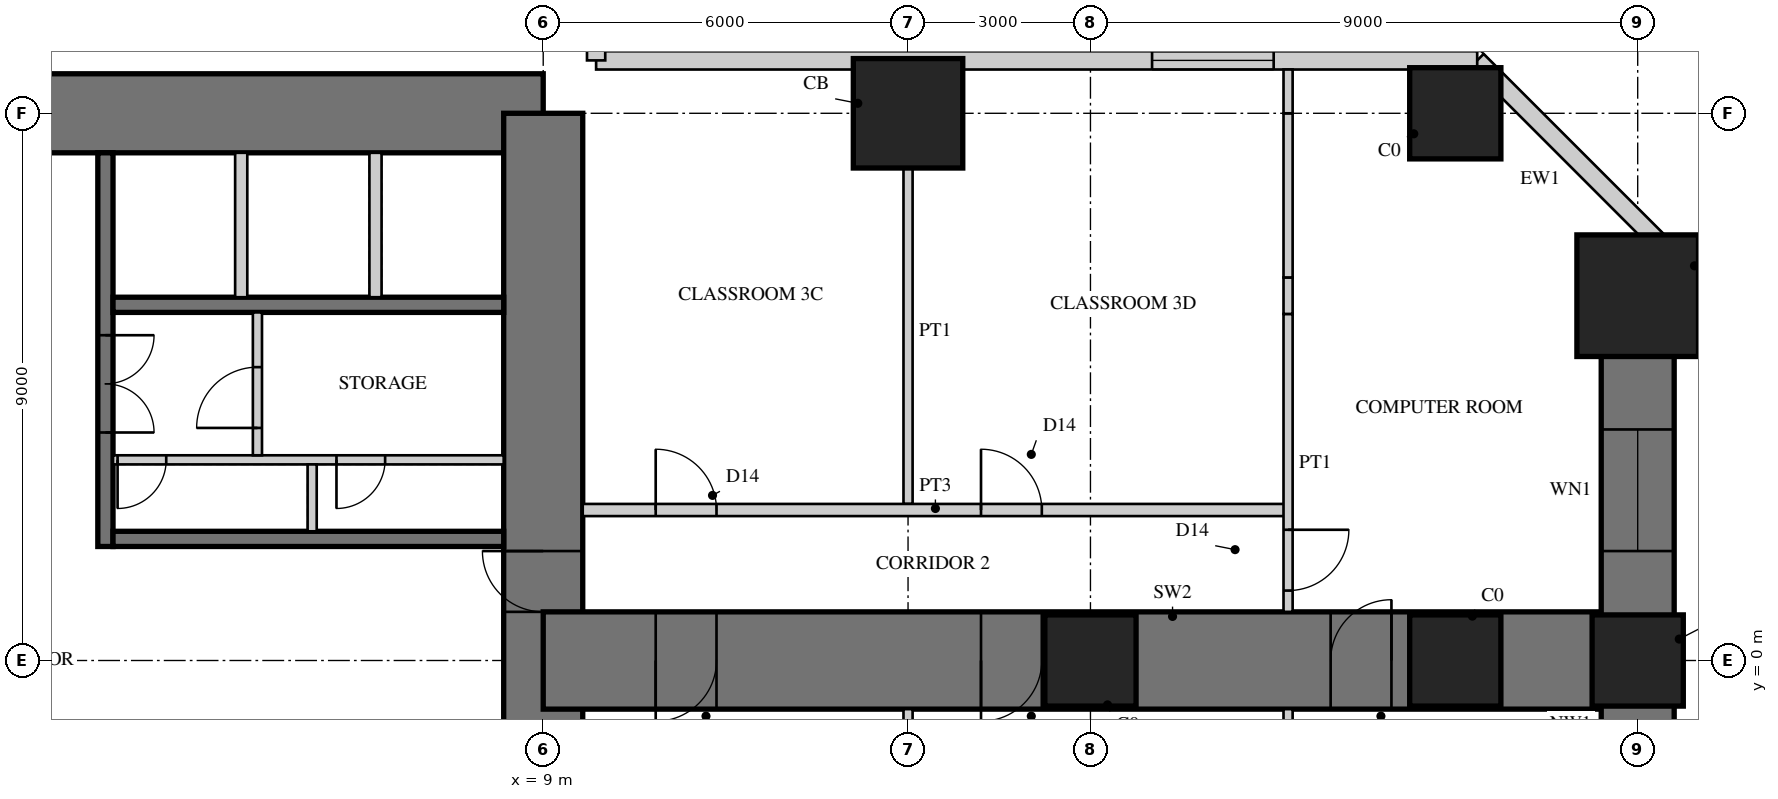
"""IFC4 building model, lengths in metres.
Left out: names, types, materials, properties, quantities, classifications, styles, units other than length and angle.
Written with IfcOpenShell. Run it as: python <this file> out.ifc"""

import sys

from ifc_helpers import new_model, si_unit, direction, frame, frame_2d, origin, origin_2d, place, context, subcontext, project, spatial, rectangle, hollow_rectangle, extrude, element, fill, save


model = new_model("IFC4")
c1 = context("Model", 3, precision=1e-05, world=origin(), true_north=direction((0.0, 1.0)))
c2 = subcontext(c1, "Body", "Model", "MODEL_VIEW")
j1 = project(units=[si_unit("LENGTHUNIT", "METRE"), si_unit("PLANEANGLEUNIT", "RADIAN")], contexts=[c1])
p1 = place(None, origin())
s1 = spatial("IfcSite", under=j1, at=p1, CompositionType="ELEMENT")
p2 = place(p1, origin())
s2 = spatial("IfcBuilding", under=s1, at=p2, CompositionType="ELEMENT")
p3 = place(p2, frame((0.0, 0.0, 14.0)))
s3 = spatial("IfcBuildingStorey", under=s2, at=p3, CompositionType="ELEMENT", Elevation=14.0)
p4 = place(p3, frame((9.0, 9.0, 0.0), z_axis=(0.0, 0.0, 1.0), x_axis=(-1.0, 0.0, 0.0)))
e1 = element("IfcWall", 1, at=p4, inside=s3, PredefinedType="SHEAR", context=c2, shape_type="SweptSolid", body=[
    extrude(rectangle(XDim=18.0, YDim=1.3, at=frame_2d((9.0, 0.0))), origin(), (0.0, 0.0, 1.0), 4.5),
])
p5 = place(p4, frame((9.8, 0.0, 0.0)))
e2 = element("IfcOpeningElement", 2, at=p5, cuts=e1, PredefinedType="OPENING", context=c2, shape_type="SweptSolid", body=[
    extrude(rectangle(XDim=1.0, YDim=2.4, at=frame_2d((0.5, 1.2))), frame((0.0, 0.66, 0.0), z_axis=(0.0, -1.0, 0.0), x_axis=(1.0, 0.0, 0.0)), (0.0, 0.0, 1.0), 1.32),
])
p6 = place(p3, frame((9.0, -9.0, 0.0), z_axis=(0.0, 0.0, 1.0), x_axis=(0.0, 1.0, 0.0)))
e3 = element("IfcWall", 3, at=p6, inside=s3, PredefinedType="SHEAR", context=c2, shape_type="SweptSolid", body=[
    extrude(rectangle(XDim=18.0, YDim=1.3, at=frame_2d((9.0, 0.0))), origin(), (0.0, 0.0, 1.0), 4.5),
])
p7 = place(p6, frame((9.8, 0.0, 0.0)))
e4 = element("IfcOpeningElement", 4, at=p7, cuts=e3, PredefinedType="OPENING", context=c2, shape_type="SweptSolid", body=[
    extrude(rectangle(XDim=1.0, YDim=2.4, at=frame_2d((0.5, 1.2))), frame((0.0, 0.66, 0.0), z_axis=(0.0, -1.0, 0.0), x_axis=(1.0, 0.0, 0.0)), (0.0, 0.0, 1.0), 1.32),
])
p8 = place(p3, frame((1.8, 1.875, 0.0), z_axis=(0.0, 0.0, 1.0), x_axis=(0.0, 1.0, 0.0)))
e5 = element("IfcWall", 5, at=p8, inside=s3, PredefinedType="SHEAR", context=c2, shape_type="SweptSolid", body=[
    extrude(rectangle(XDim=6.475, YDim=0.25, at=frame_2d((3.238, 0.0))), origin(), (0.0, 0.0, 1.0), 4.5),
])
p9 = place(p8, frame((1.875, 0.0, 0.0)))
e6 = element("IfcOpeningElement", 6, at=p9, cuts=e5, PredefinedType="OPENING", context=c2, shape_type="SweptSolid", body=[
    extrude(rectangle(XDim=1.6, YDim=2.4, at=frame_2d((0.8, 1.2))), frame((0.0, 0.135, 0.0), z_axis=(0.0, -1.0, 0.0), x_axis=(1.0, 0.0, 0.0)), (0.0, 0.0, 1.0), 0.27),
])
for number, where, z_axis, x_axis in (
    (7, (1.925, 2.0, 0.0), (0.0, 0.0, 1.0), (1.0, 0.0, 0.0)),
    (8, (1.925, 5.85, 0.0), (0.0, 0.0, 1.0), (1.0, 0.0, 0.0)),
):
    element("IfcWall", number, at=place(p3, frame(where, z_axis=z_axis, x_axis=x_axis)), inside=s3, PredefinedType="SHEAR", context=c2, shape_type="SweptSolid", body=[
        extrude(rectangle(XDim=6.425, YDim=0.25, at=frame_2d((3.212, 0.0))), origin(), (0.0, 0.0, 1.0), 4.5),
    ])
p10 = place(p3, frame((1.925, 3.3, 0.0), z_axis=(0.0, 0.0, 1.0), x_axis=(1.0, 0.0, 0.0)))
e9 = element("IfcWall", 9, at=p10, inside=s3, PredefinedType="PARTITIONING", context=c2, shape_type="SweptSolid", body=[
    extrude(rectangle(XDim=6.425, YDim=0.15, at=frame_2d((3.212, 0.0))), origin(), (0.0, 0.0, 1.0), 4.5),
])
p11 = place(p10, frame((0.075, 0.0, 0.0)))
e10 = element("IfcOpeningElement", 10, at=p11, cuts=e9, PredefinedType="OPENING", context=c2, shape_type="SweptSolid", body=[
    extrude(rectangle(XDim=0.8, YDim=2.1, at=frame_2d((0.4, 1.05))), frame((0.0, 0.085, 0.0), z_axis=(0.0, -1.0, 0.0), x_axis=(1.0, 0.0, 0.0)), (0.0, 0.0, 1.0), 0.17),
])
p12 = place(p10, frame((3.675, 0.0, 0.0)))
e11 = element("IfcOpeningElement", 11, at=p12, cuts=e9, PredefinedType="OPENING", context=c2, shape_type="SweptSolid", body=[
    extrude(rectangle(XDim=0.8, YDim=2.1, at=frame_2d((0.4, 1.05))), frame((0.0, 0.085, 0.0), z_axis=(0.0, -1.0, 0.0), x_axis=(1.0, 0.0, 0.0)), (0.0, 0.0, 1.0), 0.17),
])
p13 = place(p3, frame((5.2, 2.125, 0.0), z_axis=(0.0, 0.0, 1.0), x_axis=(0.0, 1.0, 0.0)))
e12 = element("IfcWall", 12, at=p13, inside=s3, PredefinedType="PARTITIONING", context=c2, shape_type="SweptSolid", body=[
    extrude(rectangle(XDim=1.1, YDim=0.15, at=frame_2d((0.55, 0.0))), origin(), (0.0, 0.0, 1.0), 4.5),
])
for number, where, z_axis, x_axis in (
    (13, (4.033, 5.975, 0.0), (0.0, 0.0, 1.0), (0.0, 1.0, 0.0)),
    (14, (6.242, 5.975, 0.0), (0.0, 0.0, 1.0), (0.0, 1.0, 0.0)),
):
    element("IfcWall", number, at=place(p3, frame(where, z_axis=z_axis, x_axis=x_axis)), inside=s3, PredefinedType="PARTITIONING", context=c2, shape_type="SweptSolid", body=[
        extrude(rectangle(XDim=2.375, YDim=0.2, at=frame_2d((1.188, 0.0))), origin(), (0.0, 0.0, 1.0), 4.5),
    ])
p14 = place(p3, frame((9.0, 0.0, 0.0), z_axis=(0.0, 0.0, 1.0), x_axis=(1.0, 0.0, 0.0)))
e15 = element("IfcWall", 15, at=p14, inside=s3, PredefinedType="SHEAR", context=c2, shape_type="SweptSolid", body=[
    extrude(rectangle(XDim=18.0, YDim=1.6, at=frame_2d((9.0, 0.0))), origin(), (0.0, 0.0, 1.0), 4.5),
])
p15 = place(p14, frame((1.85, 0.0, 0.0)))
e16 = element("IfcOpeningElement", 16, at=p15, cuts=e15, PredefinedType="OPENING", context=c2, shape_type="SweptSolid", body=[
    extrude(rectangle(XDim=1.0, YDim=2.2, at=frame_2d((0.5, 1.1))), frame((0.0, 0.81, 0.0), z_axis=(0.0, -1.0, 0.0), x_axis=(1.0, 0.0, 0.0)), (0.0, 0.0, 1.0), 1.62),
])
p16 = place(p14, frame((7.2, 0.0, 0.0)))
e17 = element("IfcOpeningElement", 17, at=p16, cuts=e15, PredefinedType="OPENING", context=c2, shape_type="SweptSolid", body=[
    extrude(rectangle(XDim=1.0, YDim=2.2, at=frame_2d((0.5, 1.1))), frame((0.0, 0.81, 0.0), z_axis=(0.0, -1.0, 0.0), x_axis=(1.0, 0.0, 0.0)), (0.0, 0.0, 1.0), 1.62),
])
p17 = place(p14, frame((12.95, 0.0, 0.0)))
e18 = element("IfcOpeningElement", 18, at=p17, cuts=e15, PredefinedType="OPENING", context=c2, shape_type="SweptSolid", body=[
    extrude(rectangle(XDim=1.0, YDim=2.2, at=frame_2d((0.5, 1.1))), frame((0.0, 0.81, 0.0), z_axis=(0.0, -1.0, 0.0), x_axis=(1.0, 0.0, 0.0)), (0.0, 0.0, 1.0), 1.62),
])
p18 = place(p3, frame((27.0, -6.0, 0.0), z_axis=(0.0, 0.0, 1.0), x_axis=(0.0, 1.0, 0.0)))
e19 = element("IfcWall", 19, at=p18, inside=s3, PredefinedType="SHEAR", context=c2, shape_type="SweptSolid", body=[
    extrude(rectangle(XDim=12.0, YDim=1.2, at=frame_2d((6.0, 0.0))), origin(), (0.0, 0.0, 1.0), 4.5),
])
p19 = place(p18, frame((2.2, 0.0, 0.9)))
e20 = element("IfcOpeningElement", 20, at=p19, cuts=e19, PredefinedType="OPENING", context=c2, shape_type="SweptSolid", body=[
    extrude(rectangle(XDim=2.0, YDim=1.8, at=frame_2d((1.0, 0.9))), frame((0.0, 0.61, 0.0), z_axis=(0.0, -1.0, 0.0), x_axis=(1.0, 0.0, 0.0)), (0.0, 0.0, 1.0), 1.22),
])
p20 = place(p18, frame((7.8, 0.0, 0.9)))
e21 = element("IfcOpeningElement", 21, at=p20, cuts=e19, PredefinedType="OPENING", context=c2, shape_type="SweptSolid", body=[
    extrude(rectangle(XDim=2.0, YDim=1.8, at=frame_2d((1.0, 0.9))), frame((0.0, 0.61, 0.0), z_axis=(0.0, -1.0, 0.0), x_axis=(1.0, 0.0, 0.0)), (0.0, 0.0, 1.0), 1.22),
])
p21 = place(p3, frame((15.0, 9.0, 0.0), z_axis=(0.0, 0.0, 1.0), x_axis=(1.0, 0.0, 0.0)))
e22 = element("IfcColumn", 22, at=p21, inside=s3, PredefinedType="COLUMN", context=c2, shape_type="SweptSolid", body=[
    extrude(rectangle(XDim=1.8, YDim=1.8, at=origin_2d()), origin(), (0.0, 0.0, 1.0), 4.5),
])
for number, where, z_axis, x_axis in (
    (23, (24.0, 9.0, 0.0), (0.0, 0.0, 1.0), (1.0, 0.0, 0.0)),
    (24, (27.0, 0.0, 0.0), (0.0, 0.0, 1.0), (1.0, 0.0, 0.0)),
):
    element("IfcColumn", number, at=place(p3, frame(where, z_axis=z_axis, x_axis=x_axis)), inside=s3, PredefinedType="COLUMN", context=c2, shape_type="SweptSolid", body=[
        extrude(rectangle(XDim=1.5, YDim=1.5, at=origin_2d()), origin(), (0.0, 0.0, 1.0), 4.5),
    ])
p22 = place(p3, frame((27.0, 6.0, 0.0), z_axis=(0.0, 0.0, 1.0), x_axis=(1.0, 0.0, 0.0)))
e25 = element("IfcColumn", 25, at=p22, inside=s3, PredefinedType="COLUMN", context=c2, shape_type="SweptSolid", body=[
    extrude(rectangle(XDim=2.0, YDim=2.0, at=origin_2d()), origin(), (0.0, 0.0, 1.0), 4.5),
])
for number, where, z_axis, x_axis in (
    (26, (18.0, 0.0, 0.0), (0.0, 0.0, 1.0), (1.0, 0.0, 0.0)),
    (27, (24.0, 0.0, 0.0), (0.0, 0.0, 1.0), (1.0, 0.0, 0.0)),
):
    element("IfcColumn", number, at=place(p3, frame(where, z_axis=z_axis, x_axis=x_axis)), inside=s3, PredefinedType="COLUMN", context=c2, shape_type="SweptSolid", body=[
        extrude(rectangle(XDim=1.5, YDim=1.5, at=origin_2d()), origin(), (0.0, 0.0, 1.0), 4.5),
    ])
p23 = place(p3, frame((27.6, 6.63, 0.0), z_axis=(0.0, 0.0, 1.0), x_axis=(-0.707106781187, 0.707106781187, 0.0)))
e28 = element("IfcWall", 28, at=p23, inside=s3, PredefinedType="SOLIDWALL", context=c2, shape_type="SweptSolid", body=[
    extrude(rectangle(XDim=4.582, YDim=0.3, at=frame_2d((2.291, 0.0))), origin(), (0.0, 0.0, 1.0), 4.25),
])
p24 = place(p3, frame((24.36, 9.87, 0.0), z_axis=(0.0, 0.0, 1.0), x_axis=(-1.0, 0.0, 0.0)))
e29 = element("IfcWall", 29, at=p24, inside=s3, PredefinedType="SOLIDWALL", context=c2, shape_type="SweptSolid", body=[
    extrude(rectangle(XDim=14.49, YDim=0.3, at=frame_2d((7.245, 0.0))), origin(), (0.0, 0.0, 1.0), 4.25),
])
p25 = place(p24, frame((3.347, 0.0, 0.9)))
e30 = element("IfcOpeningElement", 30, at=p25, cuts=e29, PredefinedType="OPENING", context=c2, shape_type="SweptSolid", body=[
    extrude(rectangle(XDim=2.0, YDim=1.8, at=frame_2d((1.0, 0.9))), frame((0.0, 0.16, 0.0), z_axis=(0.0, -1.0, 0.0), x_axis=(1.0, 0.0, 0.0)), (0.0, 0.0, 1.0), 0.32),
])
p26 = place(p3, frame((9.87, 9.87, 0.0), z_axis=(0.0, 0.0, 1.0), x_axis=(0.0, 1.0, 0.0)))
e31 = element("IfcWall", 31, at=p26, inside=s3, PredefinedType="SOLIDWALL", context=c2, shape_type="SweptSolid", body=[
    extrude(rectangle(XDim=14.49, YDim=0.3, at=frame_2d((7.245, 0.0))), origin(), (0.0, 0.0, 1.0), 4.25),
])
p27 = place(p26, frame((6.245, 0.0, 0.9)))
e32 = element("IfcOpeningElement", 32, at=p27, cuts=e31, PredefinedType="OPENING", context=c2, shape_type="SweptSolid", body=[
    extrude(rectangle(XDim=2.0, YDim=1.8, at=frame_2d((1.0, 0.9))), frame((0.0, 0.16, 0.0), z_axis=(0.0, -1.0, 0.0), x_axis=(1.0, 0.0, 0.0)), (0.0, 0.0, 1.0), 0.32),
])
p28 = place(p26, frame((9.143, 0.0, 0.9)))
e33 = element("IfcOpeningElement", 33, at=p28, cuts=e31, PredefinedType="OPENING", context=c2, shape_type="SweptSolid", body=[
    extrude(rectangle(XDim=2.0, YDim=1.8, at=frame_2d((1.0, 0.9))), frame((0.0, 0.16, 0.0), z_axis=(0.0, -1.0, 0.0), x_axis=(1.0, 0.0, 0.0)), (0.0, 0.0, 1.0), 0.32),
])
p29 = place(p3, frame((4.3, 3.375, 0.0), z_axis=(0.0, 0.0, 1.0), x_axis=(0.0, 1.0, 0.0)))
e34 = element("IfcWall", 34, at=p29, inside=s3, PredefinedType="PARTITIONING", context=c2, shape_type="SweptSolid", body=[
    extrude(rectangle(XDim=2.35, YDim=0.15, at=frame_2d((1.175, 0.0))), origin(), (0.0, 0.0, 1.0), 4.25),
])
p30 = place(p29, frame((0.45, 0.0, 0.0)))
e35 = element("IfcOpeningElement", 35, at=p30, cuts=e34, PredefinedType="OPENING", context=c2, shape_type="SweptSolid", body=[
    extrude(rectangle(XDim=1.0, YDim=2.1, at=frame_2d((0.5, 1.05))), frame((0.0, 0.085, 0.0), z_axis=(0.0, -1.0, 0.0), x_axis=(1.0, 0.0, 0.0)), (0.0, 0.0, 1.0), 0.17),
])
p31 = place(p3, frame((15.0, 2.575, 0.0), z_axis=(0.0, 0.0, 1.0), x_axis=(0.0, 1.0, 0.0)))
e36 = element("IfcWall", 36, at=p31, inside=s3, PredefinedType="PARTITIONING", context=c2, shape_type="SweptSolid", body=[
    extrude(rectangle(XDim=5.675, YDim=0.15, at=frame_2d((2.837, 0.0))), origin(), (0.0, 0.0, 1.0), 3.2),
])
p32 = place(p3, frame((15.0, -8.25, 0.0), z_axis=(0.0, 0.0, 1.0), x_axis=(0.0, 1.0, 0.0)))
e37 = element("IfcWall", 37, at=p32, inside=s3, PredefinedType="PARTITIONING", context=c2, shape_type="SweptSolid", body=[
    extrude(rectangle(XDim=7.45, YDim=0.15, at=frame_2d((3.725, 0.0))), origin(), (0.0, 0.0, 1.0), 3.2),
])
p33 = place(p3, frame((9.65, 2.475, 0.0), z_axis=(0.0, 0.0, 1.0), x_axis=(1.0, 0.0, 0.0)))
e38 = element("IfcWall", 38, at=p33, inside=s3, PredefinedType="SOLIDWALL", context=c2, shape_type="SweptSolid", body=[
    extrude(rectangle(XDim=11.6, YDim=0.2, at=frame_2d((5.8, 0.0))), origin(), (0.0, 0.0, 1.0), 4.25),
])
p34 = place(p33, frame((1.2, 0.0, 0.0)))
e39 = element("IfcOpeningElement", 39, at=p34, cuts=e38, PredefinedType="OPENING", context=c2, shape_type="SweptSolid", body=[
    extrude(rectangle(XDim=1.0, YDim=2.2, at=frame_2d((0.5, 1.1))), frame((0.0, 0.11, 0.0), z_axis=(0.0, -1.0, 0.0), x_axis=(1.0, 0.0, 0.0)), (0.0, 0.0, 1.0), 0.22),
])
p35 = place(p33, frame((6.55, 0.0, 0.0)))
e40 = element("IfcOpeningElement", 40, at=p35, cuts=e38, PredefinedType="OPENING", context=c2, shape_type="SweptSolid", body=[
    extrude(rectangle(XDim=1.0, YDim=2.2, at=frame_2d((0.5, 1.1))), frame((0.0, 0.11, 0.0), z_axis=(0.0, -1.0, 0.0), x_axis=(1.0, 0.0, 0.0)), (0.0, 0.0, 1.0), 0.22),
])
p36 = place(p3, frame((21.25, -5.7, 0.0), z_axis=(0.0, 0.0, 1.0), x_axis=(0.0, 1.0, 0.0)))
e41 = element("IfcWall", 41, at=p36, inside=s3, PredefinedType="PARTITIONING", context=c2, shape_type="SweptSolid", body=[
    extrude(rectangle(XDim=4.9, YDim=0.15, at=frame_2d((2.45, 0.0))), origin(), (0.0, 0.0, 1.0), 3.3),
])
p37 = place(p3, frame((21.25, 0.8, 0.0), z_axis=(0.0, 0.0, 1.0), x_axis=(0.0, 1.0, 0.0)))
e42 = element("IfcWall", 42, at=p37, inside=s3, PredefinedType="PARTITIONING", context=c2, shape_type="SweptSolid", body=[
    extrude(rectangle(XDim=4.9, YDim=0.15, at=frame_2d((2.45, 0.0))), origin(), (0.0, 0.0, 1.0), 3.3),
])
p38 = place(p37, frame((0.35, 0.0, 0.0)))
e43 = element("IfcOpeningElement", 43, at=p38, cuts=e42, PredefinedType="OPENING", context=c2, shape_type="SweptSolid", body=[
    extrude(rectangle(XDim=1.0, YDim=2.2, at=frame_2d((0.5, 1.1))), frame((0.0, 0.085, 0.0), z_axis=(0.0, -1.0, 0.0), x_axis=(1.0, 0.0, 0.0)), (0.0, 0.0, 1.0), 0.17),
])
p39 = place(p3, frame((21.25, 5.7, 0.0), z_axis=(0.0, 0.0, 1.0), x_axis=(0.0, 1.0, 0.0)))
e44 = element("IfcWall", 44, at=p39, inside=s3, PredefinedType="PARTITIONING", context=c2, shape_type="SweptSolid", body=[
    extrude(rectangle(XDim=0.6, YDim=0.15, at=frame_2d((0.3, 0.0))), origin(), (0.0, 0.0, 1.0), 4.25),
])
p40 = place(p3, frame((21.25, 6.3, 0.0), z_axis=(0.0, 0.0, 1.0), x_axis=(0.0, 1.0, 0.0)))
e45 = element("IfcWall", 45, at=p40, inside=s3, PredefinedType="PARTITIONING", context=c2, shape_type="SweptSolid", body=[
    extrude(rectangle(XDim=2.7, YDim=0.15, at=frame_2d((1.35, 0.0))), origin(), (0.0, 0.0, 1.0), 3.3),
])
p41 = place(p3, frame((21.25, 9.0, 0.0), z_axis=(0.0, 0.0, 1.0), x_axis=(0.0, 1.0, 0.0)))
e46 = element("IfcWall", 46, at=p41, inside=s3, PredefinedType="PARTITIONING", context=c2, shape_type="SweptSolid", body=[
    extrude(rectangle(XDim=0.72, YDim=0.15, at=frame_2d((0.36, 0.0))), origin(), (0.0, 0.0, 1.0), 4.25),
])
p42 = place(p20, origin())
e47 = element("IfcWindow", 47, at=p42, inside=s3, PartitioningType="SINGLE_PANEL", PredefinedType="WINDOW", context=c2, shape_type="SweptSolid", body=[
    extrude(hollow_rectangle(XDim=2.0, YDim=1.8, WallThickness=0.06, at=frame_2d((1.0, 0.9))), frame((0.0, 0.03, 0.0), z_axis=(0.0, -1.0, 0.0), x_axis=(1.0, 0.0, 0.0)), (0.0, 0.0, 1.0), 0.06),
    extrude(rectangle(XDim=1.879, YDim=1.679, at=frame_2d((1.0, 0.9))), frame((0.0, 0.03, 0.0), z_axis=(0.0, -1.0, 0.0), x_axis=(1.0, 0.0, 0.0)), (0.0, 0.0, 1.0), 0.06),
])
fill(e21, e47)
p43 = place(p25, origin())
e48 = element("IfcWindow", 48, at=p43, inside=s3, PartitioningType="SINGLE_PANEL", PredefinedType="WINDOW", context=c2, shape_type="SweptSolid", body=[
    extrude(hollow_rectangle(XDim=2.0, YDim=1.8, WallThickness=0.06, at=frame_2d((1.0, 0.9))), frame((0.0, 0.03, 0.0), z_axis=(0.0, -1.0, 0.0), x_axis=(1.0, 0.0, 0.0)), (0.0, 0.0, 1.0), 0.06),
    extrude(rectangle(XDim=1.879, YDim=1.679, at=frame_2d((1.0, 0.9))), frame((0.0, 0.03, 0.0), z_axis=(0.0, -1.0, 0.0), x_axis=(1.0, 0.0, 0.0)), (0.0, 0.0, 1.0), 0.06),
])
fill(e30, e48)
p44 = place(p30, origin())
e49 = element("IfcDoor", 49, at=p44, inside=s3, OperationType="SINGLE_SWING_LEFT", PredefinedType="DOOR", context=c2, shape_type="SweptSolid", body=[
    extrude(rectangle(XDim=1.0, YDim=2.1, at=frame_2d((0.5, 1.05))), frame((0.0, 0.025, 0.0), z_axis=(0.0, -1.0, 0.0), x_axis=(1.0, 0.0, 0.0)), (0.0, 0.0, 1.0), 0.05),
])
fill(e35, e49)
p45 = place(p34, origin())
e50 = element("IfcDoor", 50, at=p45, inside=s3, OperationType="SINGLE_SWING_LEFT", PredefinedType="DOOR", context=c2, shape_type="SweptSolid", body=[
    extrude(rectangle(XDim=1.0, YDim=2.2, at=frame_2d((0.5, 1.1))), frame((0.0, 0.025, 0.0), z_axis=(0.0, -1.0, 0.0), x_axis=(1.0, 0.0, 0.0)), (0.0, 0.0, 1.0), 0.05),
])
fill(e39, e50)
p46 = place(p35, origin())
e51 = element("IfcDoor", 51, at=p46, inside=s3, OperationType="SINGLE_SWING_LEFT", PredefinedType="DOOR", context=c2, shape_type="SweptSolid", body=[
    extrude(rectangle(XDim=1.0, YDim=2.2, at=frame_2d((0.5, 1.1))), frame((0.0, 0.025, 0.0), z_axis=(0.0, -1.0, 0.0), x_axis=(1.0, 0.0, 0.0)), (0.0, 0.0, 1.0), 0.05),
])
fill(e40, e51)
p47 = place(p38, frame((1.0, 0.0, 0.0), z_axis=(0.0, 0.0, 1.0), x_axis=(-1.0, 0.0, 0.0)))
e52 = element("IfcDoor", 52, at=p47, inside=s3, OperationType="SINGLE_SWING_LEFT", PredefinedType="DOOR", context=c2, shape_type="SweptSolid", body=[
    extrude(rectangle(XDim=1.0, YDim=2.2, at=frame_2d((0.5, 1.1))), frame((0.0, 0.025, 0.0), z_axis=(0.0, -1.0, 0.0), x_axis=(1.0, 0.0, 0.0)), (0.0, 0.0, 1.0), 0.05),
])
fill(e43, e52)
p48 = place(p15, frame((1.0, 0.0, 0.0), z_axis=(0.0, 0.0, 1.0), x_axis=(-1.0, 0.0, 0.0)))
e53 = element("IfcDoor", 53, at=p48, inside=s3, OperationType="SINGLE_SWING_RIGHT", PredefinedType="DOOR", context=c2, shape_type="SweptSolid", body=[
    extrude(rectangle(XDim=1.0, YDim=2.2, at=frame_2d((0.5, 1.1))), frame((0.0, 0.025, 0.0), z_axis=(0.0, -1.0, 0.0), x_axis=(1.0, 0.0, 0.0)), (0.0, 0.0, 1.0), 0.05),
])
fill(e16, e53)
p49 = place(p16, frame((1.0, 0.0, 0.0), z_axis=(0.0, 0.0, 1.0), x_axis=(-1.0, 0.0, 0.0)))
e54 = element("IfcDoor", 54, at=p49, inside=s3, OperationType="SINGLE_SWING_RIGHT", PredefinedType="DOOR", context=c2, shape_type="SweptSolid", body=[
    extrude(rectangle(XDim=1.0, YDim=2.2, at=frame_2d((0.5, 1.1))), frame((0.0, 0.025, 0.0), z_axis=(0.0, -1.0, 0.0), x_axis=(1.0, 0.0, 0.0)), (0.0, 0.0, 1.0), 0.05),
])
fill(e17, e54)
p50 = place(p17, origin())
e55 = element("IfcDoor", 55, at=p50, inside=s3, OperationType="SINGLE_SWING_RIGHT", PredefinedType="DOOR", context=c2, shape_type="SweptSolid", body=[
    extrude(rectangle(XDim=1.0, YDim=2.2, at=frame_2d((0.5, 1.1))), frame((0.0, 0.025, 0.0), z_axis=(0.0, -1.0, 0.0), x_axis=(1.0, 0.0, 0.0)), (0.0, 0.0, 1.0), 0.05),
])
fill(e18, e55)
p51 = place(p7, origin())
e56 = element("IfcDoor", 56, at=p51, inside=s3, OperationType="SINGLE_SWING_RIGHT", PredefinedType="DOOR", context=c2, shape_type="SweptSolid", body=[
    extrude(rectangle(XDim=1.0, YDim=2.4, at=frame_2d((0.5, 1.2))), frame((0.0, 0.055, 0.0), z_axis=(0.0, -1.0, 0.0), x_axis=(1.0, 0.0, 0.0)), (0.0, 0.0, 1.0), 0.05),
])
fill(e4, e56)
p52 = place(p9, frame((1.6, 0.0, 0.0), z_axis=(0.0, 0.0, 1.0), x_axis=(-1.0, 0.0, 0.0)))
e57 = element("IfcDoor", 57, at=p52, inside=s3, OperationType="DOUBLE_DOOR_SINGLE_SWING", PredefinedType="DOOR", context=c2, shape_type="SweptSolid", body=[
    extrude(rectangle(XDim=1.6, YDim=2.4, at=frame_2d((0.8, 1.2))), frame((0.0, 0.025, 0.0), z_axis=(0.0, -1.0, 0.0), x_axis=(1.0, 0.0, 0.0)), (0.0, 0.0, 1.0), 0.05),
])
fill(e6, e57)
p53 = place(p11, frame((0.8, 0.0, 0.0), z_axis=(0.0, 0.0, 1.0), x_axis=(-1.0, 0.0, 0.0)))
e58 = element("IfcDoor", 58, at=p53, inside=s3, OperationType="SINGLE_SWING_RIGHT", PredefinedType="DOOR", context=c2, shape_type="SweptSolid", body=[
    extrude(rectangle(XDim=0.8, YDim=2.1, at=frame_2d((0.4, 1.05))), frame((0.0, 0.025, 0.0), z_axis=(0.0, -1.0, 0.0), x_axis=(1.0, 0.0, 0.0)), (0.0, 0.0, 1.0), 0.05),
])
fill(e10, e58)
p54 = place(p12, frame((0.8, 0.0, 0.0), z_axis=(0.0, 0.0, 1.0), x_axis=(-1.0, 0.0, 0.0)))
e59 = element("IfcDoor", 59, at=p54, inside=s3, OperationType="SINGLE_SWING_RIGHT", PredefinedType="DOOR", context=c2, shape_type="SweptSolid", body=[
    extrude(rectangle(XDim=0.8, YDim=2.1, at=frame_2d((0.4, 1.05))), frame((0.0, 0.025, 0.0), z_axis=(0.0, -1.0, 0.0), x_axis=(1.0, 0.0, 0.0)), (0.0, 0.0, 1.0), 0.05),
])
fill(e11, e59)
save(model, sys.argv[1])
